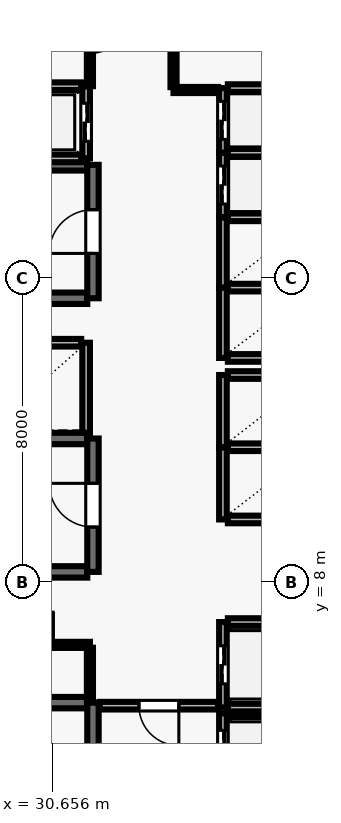
"""IFC4 building model, lengths in metres.
Left out: names, types, materials, properties, quantities, classifications, styles, units other than length and angle.
Written with IfcOpenShell. Run it as: python <this file> out.ifc"""

import sys

from ifc_helpers import new_model, si_unit, direction, frame, frame_2d, origin, place, context, subcontext, project, spatial, rectangle, extrude, element, fill, save


model = new_model("IFC4")
c1 = context("Model", 3, precision=1e-05, world=origin(), true_north=direction((0.0, 1.0)))
c2 = subcontext(c1, "Body", "Model", "MODEL_VIEW")
j1 = project(units=[si_unit("LENGTHUNIT", "METRE"), si_unit("PLANEANGLEUNIT", "RADIAN")], contexts=[c1])
p1 = place(None, origin())
s1 = spatial("IfcSite", under=j1, at=p1, CompositionType="ELEMENT")
p2 = place(p1, origin())
s2 = spatial("IfcBuilding", under=s1, at=p2, CompositionType="ELEMENT")
p3 = place(p2, frame((0.0, 0.0, 119.0)))
s3 = spatial("IfcBuildingStorey", under=s2, at=p3, CompositionType="ELEMENT", Elevation=119.0)
p4 = place(p3, frame((31.58, 4.83, 0.0), z_axis=(0.0, 0.0, 1.0), x_axis=(-1.0, 0.0, 0.0)))
e1 = element("IfcWall", 1, at=p4, inside=s3, PredefinedType="SHEAR", context=c2, shape_type="SweptSolid", body=[
    extrude(rectangle(XDim=8.36, YDim=0.3, at=frame_2d((4.18, 0.0))), origin(), (0.0, 0.0, 1.0), 3.69),
])
p5 = place(p3, frame((31.73, 0.96, 0.0), z_axis=(0.0, 0.0, 1.0), x_axis=(0.0, 1.0, 0.0)))
e2 = element("IfcWall", 2, at=p5, inside=s3, PredefinedType="SHEAR", context=c2, shape_type="SweptSolid", body=[
    extrude(rectangle(XDim=3.87, YDim=0.3, at=frame_2d((1.935, 0.0))), origin(), (0.0, 0.0, 1.0), 3.69),
])
p6 = place(p5, frame((1.54, 0.0, 0.0)))
e3 = element("IfcOpeningElement", 3, at=p6, cuts=e2, PredefinedType="OPENING", context=c2, shape_type="SweptSolid", body=[
    extrude(rectangle(XDim=1.15, YDim=2.15, at=frame_2d((0.575, 1.075))), frame((0.0, 0.16, 0.0), z_axis=(0.0, -1.0, 0.0), x_axis=(1.0, 0.0, 0.0)), (0.0, 0.0, 1.0), 0.32),
])
for number, where, z_axis, x_axis in (
    (4, (31.58, 18.98, 0.0), (0.0, 0.0, 1.0), (-1.0, 0.0, 0.0)),
    (5, (23.22, 15.47, 0.0), (0.0, 0.0, 1.0), (1.0, 0.0, 0.0)),
):
    element("IfcWall", number, at=place(p3, frame(where, z_axis=z_axis, x_axis=x_axis)), inside=s3, PredefinedType="SHEAR", context=c2, shape_type="SweptSolid", body=[
        extrude(rectangle(XDim=8.36, YDim=0.3, at=frame_2d((4.18, 0.0))), origin(), (0.0, 0.0, 1.0), 3.69),
    ])
p7 = place(p3, frame((31.73, 15.47, 0.0), z_axis=(0.0, 0.0, 1.0), x_axis=(0.0, 1.0, 0.0)))
e6 = element("IfcWall", 6, at=p7, inside=s3, PredefinedType="SHEAR", context=c2, shape_type="SweptSolid", body=[
    extrude(rectangle(XDim=3.51, YDim=0.3, at=frame_2d((1.755, 0.0))), origin(), (0.0, 0.0, 1.0), 3.69),
])
p8 = place(p7, frame((1.18, 0.0, 0.0)))
e7 = element("IfcOpeningElement", 7, at=p8, cuts=e6, PredefinedType="OPENING", context=c2, shape_type="SweptSolid", body=[
    extrude(rectangle(XDim=1.15, YDim=2.15, at=frame_2d((0.575, 1.075))), frame((0.0, 0.16, 0.0), z_axis=(0.0, -1.0, 0.0), x_axis=(1.0, 0.0, 0.0)), (0.0, 0.0, 1.0), 0.32),
])
for number, where, z_axis, x_axis in (
    (8, (31.58, 11.78, 0.0), (0.0, 0.0, 1.0), (-1.0, 0.0, 0.0)),
    (9, (23.22, 8.27, 0.0), (0.0, 0.0, 1.0), (1.0, 0.0, 0.0)),
):
    element("IfcWall", number, at=place(p3, frame(where, z_axis=z_axis, x_axis=x_axis)), inside=s3, PredefinedType="SHEAR", context=c2, shape_type="SweptSolid", body=[
        extrude(rectangle(XDim=8.36, YDim=0.3, at=frame_2d((4.18, 0.0))), origin(), (0.0, 0.0, 1.0), 3.69),
    ])
p9 = place(p3, frame((31.73, 8.27, 0.0), z_axis=(0.0, 0.0, 1.0), x_axis=(0.0, 1.0, 0.0)))
e10 = element("IfcWall", 10, at=p9, inside=s3, PredefinedType="SHEAR", context=c2, shape_type="SweptSolid", body=[
    extrude(rectangle(XDim=3.51, YDim=0.3, at=frame_2d((1.755, 0.0))), origin(), (0.0, 0.0, 1.0), 3.69),
])
p10 = place(p9, frame((1.18, 0.0, 0.0)))
e11 = element("IfcOpeningElement", 11, at=p10, cuts=e10, PredefinedType="OPENING", context=c2, shape_type="SweptSolid", body=[
    extrude(rectangle(XDim=1.15, YDim=2.15, at=frame_2d((0.575, 1.075))), frame((0.0, 0.16, 0.0), z_axis=(0.0, -1.0, 0.0), x_axis=(1.0, 0.0, 0.0)), (0.0, 0.0, 1.0), 0.32),
])
p11 = place(p3, frame((35.15, 4.55, 0.0), z_axis=(0.0, 0.0, 1.0), x_axis=(0.0, -1.0, 0.0)))
e12 = element("IfcWall", 12, at=p11, inside=s3, PredefinedType="SOLIDWALL", context=c2, shape_type="SweptSolid", body=[
    extrude(rectangle(XDim=2.1, YDim=0.2, at=frame_2d((1.05, 0.0))), origin(), (0.0, 0.0, 1.0), 3.69),
])
p12 = place(p11, frame((0.45, 0.0, 0.0)))
e13 = element("IfcOpeningElement", 13, at=p12, cuts=e12, PredefinedType="OPENING", context=c2, shape_type="SweptSolid", body=[
    extrude(rectangle(XDim=1.2, YDim=2.15, at=frame_2d((0.6, 1.075))), frame((0.0, 0.11, 0.0), z_axis=(0.0, -1.0, 0.0), x_axis=(1.0, 0.0, 0.0)), (0.0, 0.0, 1.0), 0.22),
])
p13 = place(p3, frame((37.42, 4.55, 0.0), z_axis=(0.0, 0.0, 1.0), x_axis=(-1.0, 0.0, 0.0)))
e14 = element("IfcWall", 14, at=p13, inside=s3, PredefinedType="SOLIDWALL", context=c2, shape_type="SweptSolid", body=[
    extrude(rectangle(XDim=2.14, YDim=0.2, at=frame_2d((1.07, 0.0))), origin(), (0.0, 0.0, 1.0), 3.69),
])
p14 = place(p3, frame((35.15, 6.95, 0.0), z_axis=(0.0, 0.0, 1.0), x_axis=(0.0, -1.0, 0.0)))
e15 = element("IfcWall", 15, at=p14, inside=s3, PredefinedType="SOLIDWALL", context=c2, shape_type="SweptSolid", body=[
    extrude(rectangle(XDim=2.25, YDim=0.2, at=frame_2d((1.125, 0.0))), origin(), (0.0, 0.0, 1.0), 3.69),
])
p15 = place(p14, frame((0.625, 0.0, 0.0)))
e16 = element("IfcOpeningElement", 16, at=p15, cuts=e15, PredefinedType="OPENING", context=c2, shape_type="SweptSolid", body=[
    extrude(rectangle(XDim=1.0, YDim=2.1, at=frame_2d((0.5, 1.05))), frame((0.0, 0.11, 0.0), z_axis=(0.0, -1.0, 0.0), x_axis=(1.0, 0.0, 0.0)), (0.0, 0.0, 1.0), 0.22),
])
for number, where, z_axis, x_axis in (
    (17, (35.28, 4.7, 0.0), (0.0, 0.0, 1.0), (1.0, 0.0, 0.0)),
    (18, (37.42, 6.95, 0.0), (0.0, 0.0, 1.0), (-1.0, 0.0, 0.0)),
):
    element("IfcWall", number, at=place(p3, frame(where, z_axis=z_axis, x_axis=x_axis)), inside=s3, PredefinedType="SOLIDWALL", context=c2, shape_type="SweptSolid", body=[
        extrude(rectangle(XDim=2.14, YDim=0.2, at=frame_2d((1.07, 0.0))), origin(), (0.0, 0.0, 1.0), 3.69),
    ])
p16 = place(p3, frame((35.15, 11.55, 0.0), z_axis=(0.0, 0.0, 1.0), x_axis=(0.0, -1.0, 0.0)))
e19 = element("IfcWall", 19, at=p16, inside=s3, PredefinedType="SOLIDWALL", context=c2, shape_type="SweptSolid", body=[
    extrude(rectangle(XDim=1.9, YDim=0.2, at=frame_2d((0.95, 0.0))), origin(), (0.0, 0.0, 1.0), 3.69),
])
for number, where, z_axis, x_axis in (
    (20, (35.28, 9.65, 0.0), (0.0, 0.0, 1.0), (1.0, 0.0, 0.0)),
    (21, (37.42, 11.55, 0.0), (0.0, 0.0, 1.0), (-1.0, 0.0, 0.0)),
):
    element("IfcWall", number, at=place(p3, frame(where, z_axis=z_axis, x_axis=x_axis)), inside=s3, PredefinedType="SOLIDWALL", context=c2, shape_type="SweptSolid", body=[
        extrude(rectangle(XDim=2.14, YDim=0.2, at=frame_2d((1.07, 0.0))), origin(), (0.0, 0.0, 1.0), 3.69),
    ])
p17 = place(p3, frame((35.15, 13.45, 0.0), z_axis=(0.0, 0.0, 1.0), x_axis=(0.0, -1.0, 0.0)))
e22 = element("IfcWall", 22, at=p17, inside=s3, PredefinedType="SOLIDWALL", context=c2, shape_type="SweptSolid", body=[
    extrude(rectangle(XDim=1.9, YDim=0.2, at=frame_2d((0.95, 0.0))), origin(), (0.0, 0.0, 1.0), 3.69),
])
p18 = place(p3, frame((37.42, 13.45, 0.0), z_axis=(0.0, 0.0, 1.0), x_axis=(-1.0, 0.0, 0.0)))
e23 = element("IfcWall", 23, at=p18, inside=s3, PredefinedType="SOLIDWALL", context=c2, shape_type="SweptSolid", body=[
    extrude(rectangle(XDim=2.14, YDim=0.2, at=frame_2d((1.07, 0.0))), origin(), (0.0, 0.0, 1.0), 3.69),
])
p19 = place(p3, frame((31.55, 11.93, 0.0), z_axis=(0.0, 0.0, 1.0), x_axis=(0.0, 1.0, 0.0)))
e24 = element("IfcWall", 24, at=p19, inside=s3, PredefinedType="SOLIDWALL", context=c2, shape_type="SweptSolid", body=[
    extrude(rectangle(XDim=2.37, YDim=0.2, at=frame_2d((1.185, 0.0))), origin(), (0.0, 0.0, 1.0), 3.69),
])
p20 = place(p3, frame((31.42, 14.3, 0.0), z_axis=(0.0, 0.0, 1.0), x_axis=(-1.0, 0.0, 0.0)))
e25 = element("IfcWall", 25, at=p20, inside=s3, PredefinedType="SOLIDWALL", context=c2, shape_type="SweptSolid", body=[
    extrude(rectangle(XDim=2.44, YDim=0.2, at=frame_2d((1.22, 0.0))), origin(), (0.0, 0.0, 1.0), 3.69),
])
p21 = place(p3, frame((35.15, 15.75, 0.0), z_axis=(0.0, 0.0, 1.0), x_axis=(0.0, -1.0, 0.0)))
e26 = element("IfcWall", 26, at=p21, inside=s3, PredefinedType="SOLIDWALL", context=c2, shape_type="SweptSolid", body=[
    extrude(rectangle(XDim=1.85, YDim=0.2, at=frame_2d((0.925, 0.0))), origin(), (0.0, 0.0, 1.0), 3.69),
])
for number, where, z_axis, x_axis in (
    (27, (35.28, 13.9, 0.0), (0.0, 0.0, 1.0), (1.0, 0.0, 0.0)),
    (28, (37.42, 15.75, 0.0), (0.0, 0.0, 1.0), (-1.0, 0.0, 0.0)),
):
    element("IfcWall", number, at=place(p3, frame(where, z_axis=z_axis, x_axis=x_axis)), inside=s3, PredefinedType="SOLIDWALL", context=c2, shape_type="SweptSolid", body=[
        extrude(rectangle(XDim=2.14, YDim=0.2, at=frame_2d((1.07, 0.0))), origin(), (0.0, 0.0, 1.0), 3.69),
    ])
p22 = place(p3, frame((35.15, 17.6, 0.0), z_axis=(0.0, 0.0, 1.0), x_axis=(0.0, -1.0, 0.0)))
e29 = element("IfcWall", 29, at=p22, inside=s3, PredefinedType="SOLIDWALL", context=c2, shape_type="SweptSolid", body=[
    extrude(rectangle(XDim=1.85, YDim=0.2, at=frame_2d((0.925, 0.0))), origin(), (0.0, 0.0, 1.0), 3.69),
])
p23 = place(p3, frame((37.42, 17.6, 0.0), z_axis=(0.0, 0.0, 1.0), x_axis=(-1.0, 0.0, 0.0)))
e30 = element("IfcWall", 30, at=p23, inside=s3, PredefinedType="SOLIDWALL", context=c2, shape_type="SweptSolid", body=[
    extrude(rectangle(XDim=2.14, YDim=0.2, at=frame_2d((1.07, 0.0))), origin(), (0.0, 0.0, 1.0), 3.69),
])
p24 = place(p3, frame((35.15, 19.3, 0.0), z_axis=(0.0, 0.0, 1.0), x_axis=(0.0, -1.0, 0.0)))
e31 = element("IfcWall", 31, at=p24, inside=s3, PredefinedType="SOLIDWALL", context=c2, shape_type="SweptSolid", body=[
    extrude(rectangle(XDim=1.7, YDim=0.2, at=frame_2d((0.85, 0.0))), origin(), (0.0, 0.0, 1.0), 3.69),
])
p25 = place(p24, frame((0.35, 0.0, 0.0)))
e32 = element("IfcOpeningElement", 32, at=p25, cuts=e31, PredefinedType="OPENING", context=c2, shape_type="SweptSolid", body=[
    extrude(rectangle(XDim=1.0, YDim=2.1, at=frame_2d((0.5, 1.05))), frame((0.0, 0.11, 0.0), z_axis=(0.0, -1.0, 0.0), x_axis=(1.0, 0.0, 0.0)), (0.0, 0.0, 1.0), 0.22),
])
p26 = place(p3, frame((37.42, 19.3, 0.0), z_axis=(0.0, 0.0, 1.0), x_axis=(-1.0, 0.0, 0.0)))
e33 = element("IfcWall", 33, at=p26, inside=s3, PredefinedType="SOLIDWALL", context=c2, shape_type="SweptSolid", body=[
    extrude(rectangle(XDim=2.14, YDim=0.2, at=frame_2d((1.07, 0.0))), origin(), (0.0, 0.0, 1.0), 3.69),
])
p27 = place(p3, frame((35.15, 21.0, 0.0), z_axis=(0.0, 0.0, 1.0), x_axis=(0.0, -1.0, 0.0)))
e34 = element("IfcWall", 34, at=p27, inside=s3, PredefinedType="SOLIDWALL", context=c2, shape_type="SweptSolid", body=[
    extrude(rectangle(XDim=1.7, YDim=0.2, at=frame_2d((0.85, 0.0))), origin(), (0.0, 0.0, 1.0), 3.69),
])
p28 = place(p27, frame((0.35, 0.0, 0.0)))
e35 = element("IfcOpeningElement", 35, at=p28, cuts=e34, PredefinedType="OPENING", context=c2, shape_type="SweptSolid", body=[
    extrude(rectangle(XDim=1.0, YDim=2.1, at=frame_2d((0.5, 1.05))), frame((0.0, 0.11, 0.0), z_axis=(0.0, -1.0, 0.0), x_axis=(1.0, 0.0, 0.0)), (0.0, 0.0, 1.0), 0.22),
])
p29 = place(p3, frame((37.42, 21.0, 0.0), z_axis=(0.0, 0.0, 1.0), x_axis=(-1.0, 0.0, 0.0)))
e36 = element("IfcWall", 36, at=p29, inside=s3, PredefinedType="SOLIDWALL", context=c2, shape_type="SweptSolid", body=[
    extrude(rectangle(XDim=2.14, YDim=0.2, at=frame_2d((1.07, 0.0))), origin(), (0.0, 0.0, 1.0), 3.69),
])
p30 = place(p3, frame((31.55, 19.15, 0.0), z_axis=(0.0, 0.0, 1.0), x_axis=(0.0, 1.0, 0.0)))
e37 = element("IfcWall", 37, at=p30, inside=s3, PredefinedType="SOLIDWALL", context=c2, shape_type="SweptSolid", body=[
    extrude(rectangle(XDim=1.9, YDim=0.2, at=frame_2d((0.95, 0.0))), origin(), (0.0, 0.0, 1.0), 3.69),
])
p31 = place(p30, frame((0.45, 0.0, 0.0)))
e38 = element("IfcOpeningElement", 38, at=p31, cuts=e37, PredefinedType="OPENING", context=c2, shape_type="SweptSolid", body=[
    extrude(rectangle(XDim=1.0, YDim=2.1, at=frame_2d((0.5, 1.05))), frame((0.0, 0.11, 0.0), z_axis=(0.0, -1.0, 0.0), x_axis=(1.0, 0.0, 0.0)), (0.0, 0.0, 1.0), 0.22),
])
for number, where, z_axis, x_axis in (
    (39, (28.98, 19.15, 0.0), (0.0, 0.0, 1.0), (1.0, 0.0, 0.0)),
    (40, (31.42, 21.05, 0.0), (0.0, 0.0, 1.0), (-1.0, 0.0, 0.0)),
):
    element("IfcWall", number, at=place(p3, frame(where, z_axis=z_axis, x_axis=x_axis)), inside=s3, PredefinedType="SOLIDWALL", context=c2, shape_type="SweptSolid", body=[
        extrude(rectangle(XDim=2.44, YDim=0.2, at=frame_2d((1.22, 0.0))), origin(), (0.0, 0.0, 1.0), 3.69),
    ])
p32 = place(p3, frame((28.85, 6.35, 0.0), z_axis=(0.0, 0.0, 1.0), x_axis=(1.0, 0.0, 0.0)))
e41 = element("IfcWall", 41, at=p32, inside=s3, PredefinedType="PARTITIONING", context=c2, shape_type="SweptSolid", body=[
    extrude(rectangle(XDim=2.8, YDim=0.16, at=frame_2d((1.4, 0.0))), origin(), (0.0, 0.0, 1.0), 3.69),
])
p33 = place(p32, frame((0.96, 0.0, 0.0)))
e42 = element("IfcOpeningElement", 42, at=p33, cuts=e41, PredefinedType="OPENING", context=c2, shape_type="SweptSolid", body=[
    extrude(rectangle(XDim=0.88, YDim=2.1, at=frame_2d((0.44, 1.05))), frame((0.0, 0.09, 0.0), z_axis=(0.0, -1.0, 0.0), x_axis=(1.0, 0.0, 0.0)), (0.0, 0.0, 1.0), 0.18),
])
p34 = place(p3, frame((35.02, 4.75, 0.0), z_axis=(0.0, 0.0, 1.0), x_axis=(-1.0, 0.0, 0.0)))
e43 = element("IfcWall", 43, at=p34, inside=s3, PredefinedType="SOLIDWALL", context=c2, shape_type="SweptSolid", body=[
    extrude(rectangle(XDim=3.11, YDim=0.2, at=frame_2d((1.555, 0.0))), origin(), (0.0, 0.0, 1.0), 3.69),
])
p35 = place(p34, frame((1.03, 0.0, 0.0)))
e44 = element("IfcOpeningElement", 44, at=p35, cuts=e43, PredefinedType="OPENING", context=c2, shape_type="SweptSolid", body=[
    extrude(rectangle(XDim=1.05, YDim=2.15, at=frame_2d((0.525, 1.075))), frame((0.0, 0.11, 0.0), z_axis=(0.0, -1.0, 0.0), x_axis=(1.0, 0.0, 0.0)), (0.0, 0.0, 1.0), 0.22),
])
p36 = place(p3, frame((35.02, 20.95, 0.0), z_axis=(0.0, 0.0, 1.0), x_axis=(-1.0, 0.0, 0.0)))
e45 = element("IfcWall", 45, at=p36, inside=s3, PredefinedType="PARTITIONING", context=c2, shape_type="SweptSolid", body=[
    extrude(rectangle(XDim=1.17, YDim=0.16, at=frame_2d((0.585, 0.0))), origin(), (0.0, 0.0, 1.0), 3.69),
])
p37 = place(p3, frame((31.65, 4.86, 0.0), z_axis=(0.0, 0.0, 1.0), x_axis=(0.0, 1.0, 0.0)))
e46 = element("IfcWall", 46, at=p37, inside=s3, PredefinedType="PARTITIONING", context=c2, shape_type="SweptSolid", body=[
    extrude(rectangle(XDim=1.415, YDim=0.16, at=frame_2d((0.708, 0.0))), origin(), (0.0, 0.0, 1.0), 3.69),
])
p38 = place(p3, frame((31.65, 23.775, 0.0), z_axis=(0.0, 0.0, 1.0), x_axis=(0.0, -1.0, 0.0)))
e47 = element("IfcWall", 47, at=p38, inside=s3, PredefinedType="PARTITIONING", context=c2, shape_type="SweptSolid", body=[
    extrude(rectangle(XDim=2.725, YDim=0.16, at=frame_2d((1.362, 0.0))), origin(), (0.0, 0.0, 1.0), 3.69),
])
p39 = place(p38, frame((0.862, 0.0, 0.0)))
e48 = element("IfcOpeningElement", 48, at=p39, cuts=e47, PredefinedType="OPENING", context=c2, shape_type="SweptSolid", body=[
    extrude(rectangle(XDim=1.0, YDim=2.1, at=frame_2d((0.5, 1.05))), frame((0.0, 0.09, 0.0), z_axis=(0.0, -1.0, 0.0), x_axis=(1.0, 0.0, 0.0)), (0.0, 0.0, 1.0), 0.18),
])
p40 = place(p3, frame((33.85, 21.025, 0.0), z_axis=(0.0, 0.0, 1.0), x_axis=(0.0, 1.0, 0.0)))
e49 = element("IfcWall", 49, at=p40, inside=s3, PredefinedType="PARTITIONING", context=c2, shape_type="SweptSolid", body=[
    extrude(rectangle(XDim=2.75, YDim=0.16, at=frame_2d((1.375, 0.0))), origin(), (0.0, 0.0, 1.0), 3.69),
])
p41 = place(p8, origin())
e50 = element("IfcDoor", 50, at=p41, inside=s3, OperationType="SINGLE_SWING_LEFT", PredefinedType="DOOR", context=c2, shape_type="SweptSolid", body=[
    extrude(rectangle(XDim=1.15, YDim=2.15, at=frame_2d((0.575, 1.075))), frame((0.0, 0.025, 0.0), z_axis=(0.0, -1.0, 0.0), x_axis=(1.0, 0.0, 0.0)), (0.0, 0.0, 1.0), 0.05),
])
fill(e7, e50)
p42 = place(p10, origin())
e51 = element("IfcDoor", 51, at=p42, inside=s3, OperationType="SINGLE_SWING_RIGHT", PredefinedType="DOOR", context=c2, shape_type="SweptSolid", body=[
    extrude(rectangle(XDim=1.15, YDim=2.15, at=frame_2d((0.575, 1.075))), frame((0.0, 0.025, 0.0), z_axis=(0.0, -1.0, 0.0), x_axis=(1.0, 0.0, 0.0)), (0.0, 0.0, 1.0), 0.05),
])
fill(e11, e51)
p43 = place(p12, origin())
e52 = element("IfcDoor", 52, at=p43, inside=s3, OperationType="DOUBLE_DOOR_SLIDING", PredefinedType="DOOR", context=c2, shape_type="SweptSolid", body=[
    extrude(rectangle(XDim=1.2, YDim=2.15, at=frame_2d((0.6, 1.075))), frame((0.0, 0.025, 0.0), z_axis=(0.0, -1.0, 0.0), x_axis=(1.0, 0.0, 0.0)), (0.0, 0.0, 1.0), 0.05),
])
fill(e13, e52)
p44 = place(p15, origin())
e53 = element("IfcDoor", 53, at=p44, inside=s3, OperationType="DOUBLE_DOOR_SLIDING", PredefinedType="DOOR", context=c2, shape_type="SweptSolid", body=[
    extrude(rectangle(XDim=1.0, YDim=2.1, at=frame_2d((0.5, 1.05))), frame((0.0, 0.025, 0.0), z_axis=(0.0, -1.0, 0.0), x_axis=(1.0, 0.0, 0.0)), (0.0, 0.0, 1.0), 0.05),
])
fill(e16, e53)
p45 = place(p25, origin())
e54 = element("IfcDoor", 54, at=p45, inside=s3, OperationType="DOUBLE_DOOR_SLIDING", PredefinedType="DOOR", context=c2, shape_type="SweptSolid", body=[
    extrude(rectangle(XDim=1.0, YDim=2.1, at=frame_2d((0.5, 1.05))), frame((0.0, 0.025, 0.0), z_axis=(0.0, -1.0, 0.0), x_axis=(1.0, 0.0, 0.0)), (0.0, 0.0, 1.0), 0.05),
])
fill(e32, e54)
p46 = place(p28, origin())
e55 = element("IfcDoor", 55, at=p46, inside=s3, OperationType="DOUBLE_DOOR_SLIDING", PredefinedType="DOOR", context=c2, shape_type="SweptSolid", body=[
    extrude(rectangle(XDim=1.0, YDim=2.1, at=frame_2d((0.5, 1.05))), frame((0.0, 0.025, 0.0), z_axis=(0.0, -1.0, 0.0), x_axis=(1.0, 0.0, 0.0)), (0.0, 0.0, 1.0), 0.05),
])
fill(e35, e55)
p47 = place(p31, origin())
e56 = element("IfcDoor", 56, at=p47, inside=s3, OperationType="DOUBLE_DOOR_SLIDING", PredefinedType="DOOR", context=c2, shape_type="SweptSolid", body=[
    extrude(rectangle(XDim=1.0, YDim=2.1, at=frame_2d((0.5, 1.05))), frame((0.0, 0.025, 0.0), z_axis=(0.0, -1.0, 0.0), x_axis=(1.0, 0.0, 0.0)), (0.0, 0.0, 1.0), 0.05),
])
fill(e38, e56)
p48 = place(p35, origin())
e57 = element("IfcDoor", 57, at=p48, inside=s3, OperationType="SINGLE_SWING_LEFT", PredefinedType="DOOR", context=c2, shape_type="SweptSolid", body=[
    extrude(rectangle(XDim=1.05, YDim=2.15, at=frame_2d((0.525, 1.075))), frame((0.0, 0.025, 0.0), z_axis=(0.0, -1.0, 0.0), x_axis=(1.0, 0.0, 0.0)), (0.0, 0.0, 1.0), 0.05),
])
fill(e44, e57)
p49 = place(p39, origin())
e58 = element("IfcDoor", 58, at=p49, inside=s3, OperationType="SINGLE_SWING_LEFT", PredefinedType="DOOR", context=c2, shape_type="SweptSolid", body=[
    extrude(rectangle(XDim=1.0, YDim=2.1, at=frame_2d((0.5, 1.05))), frame((0.0, 0.025, 0.0), z_axis=(0.0, -1.0, 0.0), x_axis=(1.0, 0.0, 0.0)), (0.0, 0.0, 1.0), 0.05),
])
fill(e48, e58)
p50 = place(p33, origin())
e59 = element("IfcDoor", 59, at=p50, inside=s3, OperationType="SINGLE_SWING_RIGHT", PredefinedType="DOOR", context=c2, shape_type="SweptSolid", body=[
    extrude(rectangle(XDim=0.88, YDim=2.1, at=frame_2d((0.44, 1.05))), frame((0.0, 0.025, 0.0), z_axis=(0.0, -1.0, 0.0), x_axis=(1.0, 0.0, 0.0)), (0.0, 0.0, 1.0), 0.05),
])
fill(e42, e59)
save(model, sys.argv[1])
